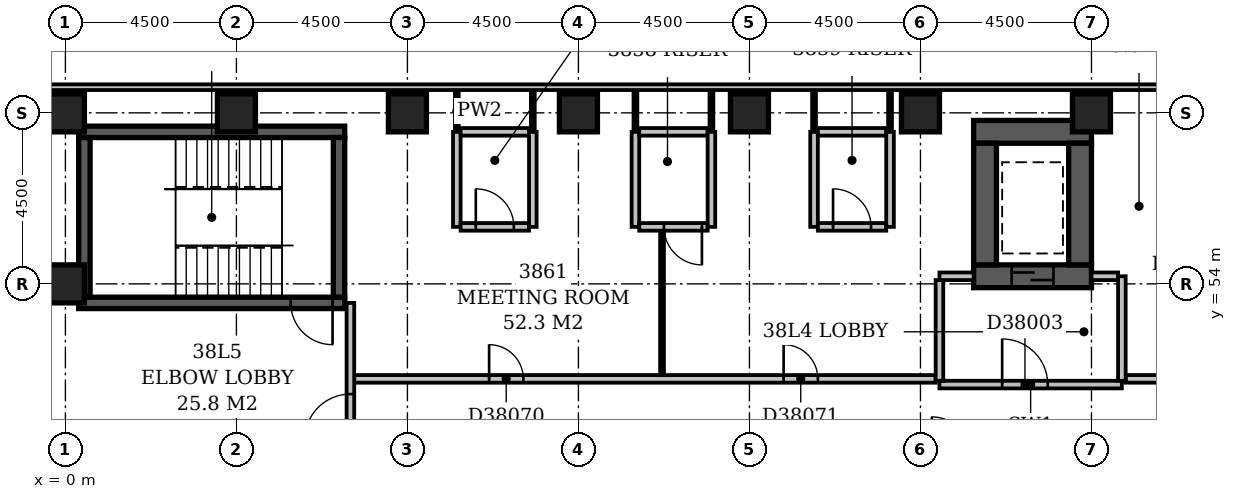
"""IFC4 building model, lengths in metres.
Left out: names, types, materials, properties, quantities, classifications, styles, units other than length and angle.
Written with IfcOpenShell. Run it as: python <this file> out.ifc"""

import sys

from ifc_helpers import new_model, si_unit, direction, frame, frame_2d, origin, origin_2d, place, context, subcontext, project, spatial, rectangle, extrude, element, fill, save


model = new_model("IFC4")
c1 = context("Model", 3, precision=1e-05, world=origin(), true_north=direction((0.0, 1.0)))
c2 = subcontext(c1, "Body", "Model", "MODEL_VIEW")
j1 = project(units=[si_unit("LENGTHUNIT", "METRE"), si_unit("PLANEANGLEUNIT", "RADIAN")], contexts=[c1])
p1 = place(None, origin())
s1 = spatial("IfcSite", under=j1, at=p1, CompositionType="ELEMENT")
p2 = place(p1, origin())
s2 = spatial("IfcBuilding", under=s1, at=p2, CompositionType="ELEMENT")
p3 = place(p2, frame((0.0, 0.0, 152.0)))
s3 = spatial("IfcBuildingStorey", under=s2, at=p3, CompositionType="ELEMENT", Elevation=152.0)
p4 = place(p3, frame((0.35, 53.5, -0.3), z_axis=(0.0, 0.0, 1.0), x_axis=(1.0, 0.0, 0.0)))
e1 = element("IfcWall", 1, at=p4, inside=s3, PredefinedType="SHEAR", context=c2, shape_type="SweptSolid", body=[
    extrude(rectangle(XDim=7.0, YDim=0.3, at=frame_2d((3.5, 0.0))), origin(), (0.0, 0.0, 1.0), 3.6),
])
p5 = place(p4, frame((5.58, 0.0, 0.3)))
e2 = element("IfcOpeningElement", 2, at=p5, cuts=e1, PredefinedType="OPENING", context=c2, shape_type="SweptSolid", body=[
    extrude(rectangle(XDim=1.1, YDim=2.1, at=frame_2d((0.55, 1.05))), frame((0.0, 0.162, 0.0), z_axis=(0.0, -1.0, 0.0), x_axis=(1.0, 0.0, 0.0)), (0.0, 0.0, 1.0), 0.324),
])
p6 = place(p3, frame((0.35, 58.0, -0.3), z_axis=(0.0, 0.0, 1.0), x_axis=(1.0, 0.0, 0.0)))
e3 = element("IfcWall", 3, at=p6, inside=s3, PredefinedType="SHEAR", context=c2, shape_type="SweptSolid", body=[
    extrude(rectangle(XDim=7.0, YDim=0.3, at=frame_2d((3.5, 0.0))), origin(), (0.0, 0.0, 1.0), 3.6),
])
for number, where, z_axis, x_axis in (
    (4, (0.5, 53.65, -0.3), (0.0, 0.0, 1.0), (0.0, 1.0, 0.0)),
    (5, (7.2, 53.65, -0.3), (0.0, 0.0, 1.0), (0.0, 1.0, 0.0)),
):
    element("IfcWall", number, at=place(p3, frame(where, z_axis=z_axis, x_axis=x_axis)), inside=s3, PredefinedType="SHEAR", context=c2, shape_type="SweptSolid", body=[
        extrude(rectangle(XDim=4.2, YDim=0.3, at=frame_2d((2.1, 0.0))), origin(), (0.0, 0.0, 1.0), 3.6),
    ])
p7 = place(p3, frame((23.9, 54.2, -0.3), z_axis=(0.0, 0.0, 1.0), x_axis=(1.0, 0.0, 0.0)))
e6 = element("IfcWall", 6, at=p7, inside=s3, PredefinedType="SHEAR", context=c2, shape_type="SweptSolid", body=[
    extrude(rectangle(XDim=3.1, YDim=0.6, at=frame_2d((1.55, 0.0))), origin(), (0.0, 0.0, 1.0), 3.6),
])
p8 = place(p7, frame((1.0, 0.0, 0.3)))
e7 = element("IfcOpeningElement", 7, at=p8, cuts=e6, PredefinedType="OPENING", context=c2, shape_type="SweptSolid", body=[
    extrude(rectangle(XDim=1.1, YDim=2.1, at=frame_2d((0.55, 1.05))), frame((0.0, 0.312, 0.0), z_axis=(0.0, -1.0, 0.0), x_axis=(1.0, 0.0, 0.0)), (0.0, 0.0, 1.0), 0.624),
])
p9 = place(p3, frame((23.9, 58.0, -0.3), z_axis=(0.0, 0.0, 1.0), x_axis=(1.0, 0.0, 0.0)))
e8 = element("IfcWall", 8, at=p9, inside=s3, PredefinedType="SHEAR", context=c2, shape_type="SweptSolid", body=[
    extrude(rectangle(XDim=3.1, YDim=0.6, at=frame_2d((1.55, 0.0))), origin(), (0.0, 0.0, 1.0), 3.6),
])
for number, where, z_axis, x_axis in (
    (9, (24.2, 54.5, -0.3), (0.0, 0.0, 1.0), (0.0, 1.0, 0.0)),
    (10, (26.7, 54.5, -0.3), (0.0, 0.0, 1.0), (0.0, 1.0, 0.0)),
):
    element("IfcWall", number, at=place(p3, frame(where, z_axis=z_axis, x_axis=x_axis)), inside=s3, PredefinedType="SHEAR", context=c2, shape_type="SweptSolid", body=[
        extrude(rectangle(XDim=3.2, YDim=0.6, at=frame_2d((1.6, 0.0))), origin(), (0.0, 0.0, 1.0), 3.6),
    ])
for number, where, z_axis, x_axis in (
    (11, (0.0, 54.0, -0.3), (0.0, 0.0, 1.0), (1.0, 0.0, 0.0)),
    (12, (0.0, 58.5, -0.3), (0.0, 0.0, 1.0), (1.0, 0.0, 0.0)),
    (13, (4.5, 58.5, -0.3), (0.0, 0.0, 1.0), (1.0, 0.0, 0.0)),
    (14, (9.0, 58.5, -0.3), (0.0, 0.0, 1.0), (1.0, 0.0, 0.0)),
    (15, (13.5, 58.5, -0.3), (0.0, 0.0, 1.0), (1.0, 0.0, 0.0)),
    (16, (18.0, 58.5, -0.3), (0.0, 0.0, 1.0), (1.0, 0.0, 0.0)),
    (17, (22.5, 58.5, -0.3), (0.0, 0.0, 1.0), (1.0, 0.0, 0.0)),
    (18, (27.0, 58.5, -0.3), (0.0, 0.0, 1.0), (1.0, 0.0, 0.0)),
):
    element("IfcColumn", number, at=place(p3, frame(where, z_axis=z_axis, x_axis=x_axis)), inside=s3, PredefinedType="COLUMN", context=c2, shape_type="SweptSolid", body=[
        extrude(rectangle(XDim=1.0, YDim=1.0, at=origin_2d()), origin(), (0.0, 0.0, 1.0), 3.6),
    ])
p10 = place(p3, frame((68.1, 59.175, 0.0), z_axis=(0.0, 0.0, 1.0), x_axis=(-1.0, 0.0, 0.0)))
e19 = element("IfcWall", 19, at=p10, inside=s3, PredefinedType="STANDARD", context=c2, shape_type="SweptSolid", body=[
    extrude(rectangle(XDim=68.85, YDim=0.15, at=frame_2d((34.425, 0.0))), origin(), (0.0, 0.0, 1.0), 2.7),
])
p11 = place(p10, frame((1.65, 0.0, 0.6)))
e20 = element("IfcOpeningElement", 20, at=p11, cuts=e19, PredefinedType="OPENING", context=c2, shape_type="SweptSolid", body=[
    extrude(rectangle(XDim=2.4, YDim=1.8, at=frame_2d((1.2, 0.9))), frame((0.0, 0.087, 0.0), z_axis=(0.0, -1.0, 0.0), x_axis=(1.0, 0.0, 0.0)), (0.0, 0.0, 1.0), 0.174),
])
p12 = place(p10, frame((5.86, 0.0, 0.6)))
e21 = element("IfcOpeningElement", 21, at=p12, cuts=e19, PredefinedType="OPENING", context=c2, shape_type="SweptSolid", body=[
    extrude(rectangle(XDim=1.8, YDim=1.8, at=frame_2d((0.9, 0.9))), frame((0.0, 0.087, 0.0), z_axis=(0.0, -1.0, 0.0), x_axis=(1.0, 0.0, 0.0)), (0.0, 0.0, 1.0), 0.174),
])
p13 = place(p10, frame((15.15, 0.0, 0.6)))
e22 = element("IfcOpeningElement", 22, at=p13, cuts=e19, PredefinedType="OPENING", context=c2, shape_type="SweptSolid", body=[
    extrude(rectangle(XDim=2.4, YDim=1.8, at=frame_2d((1.2, 0.9))), frame((0.0, 0.087, 0.0), z_axis=(0.0, -1.0, 0.0), x_axis=(1.0, 0.0, 0.0)), (0.0, 0.0, 1.0), 0.174),
])
p14 = place(p3, frame((23.0, 51.35, 0.0), z_axis=(0.0, 0.0, 1.0), x_axis=(1.0, 0.0, 0.0)))
e23 = element("IfcWall", 23, at=p14, inside=s3, PredefinedType="PARTITIONING", context=c2, shape_type="SweptSolid", body=[
    extrude(rectangle(XDim=4.8, YDim=0.2, at=frame_2d((2.4, 0.0))), origin(), (0.0, 0.0, 1.0), 3.3),
])
p15 = place(p14, frame((1.65, 0.0, 0.0)))
e24 = element("IfcOpeningElement", 24, at=p15, cuts=e23, PredefinedType="OPENING", context=c2, shape_type="SweptSolid", body=[
    extrude(rectangle(XDim=1.2, YDim=2.1, at=frame_2d((0.6, 1.05))), frame((0.0, 0.112, 0.0), z_axis=(0.0, -1.0, 0.0), x_axis=(1.0, 0.0, 0.0)), (0.0, 0.0, 1.0), 0.224),
])
p16 = place(p3, frame((27.8, 51.45, 0.0), z_axis=(0.0, 0.0, 1.0), x_axis=(0.0, 1.0, 0.0)))
e25 = element("IfcWall", 25, at=p16, inside=s3, PredefinedType="PARTITIONING", context=c2, shape_type="SweptSolid", body=[
    extrude(rectangle(XDim=2.75, YDim=0.2, at=frame_2d((1.375, 0.0))), origin(), (0.0, 0.0, 1.0), 3.3),
])
p17 = place(p3, frame((23.0, 54.2, 0.0), z_axis=(0.0, 0.0, 1.0), x_axis=(1.0, 0.0, 0.0)))
e26 = element("IfcWall", 26, at=p17, inside=s3, PredefinedType="PARTITIONING", context=c2, shape_type="SweptSolid", body=[
    extrude(rectangle(XDim=0.9, YDim=0.2, at=frame_2d((0.45, 0.0))), origin(), (0.0, 0.0, 1.0), 3.3),
])
p18 = place(p3, frame((27.0, 54.2, 0.0), z_axis=(0.0, 0.0, 1.0), x_axis=(1.0, 0.0, 0.0)))
e27 = element("IfcWall", 27, at=p18, inside=s3, PredefinedType="PARTITIONING", context=c2, shape_type="SweptSolid", body=[
    extrude(rectangle(XDim=0.7, YDim=0.2, at=frame_2d((0.35, 0.0))), origin(), (0.0, 0.0, 1.0), 3.3),
])
p19 = place(p3, frame((23.0, 51.45, 0.0), z_axis=(0.0, 0.0, 1.0), x_axis=(0.0, 1.0, 0.0)))
e28 = element("IfcWall", 28, at=p19, inside=s3, PredefinedType="PARTITIONING", context=c2, shape_type="SweptSolid", body=[
    extrude(rectangle(XDim=2.65, YDim=0.2, at=frame_2d((1.325, 0.0))), origin(), (0.0, 0.0, 1.0), 3.3),
])
p20 = place(p3, frame((7.5, 49.6, 0.0), z_axis=(0.0, 0.0, 1.0), x_axis=(0.0, 1.0, 0.0)))
e29 = element("IfcWall", 29, at=p20, inside=s3, PredefinedType="PARTITIONING", context=c2, shape_type="SweptSolid", body=[
    extrude(rectangle(XDim=3.9, YDim=0.2, at=frame_2d((1.95, 0.0))), origin(), (0.0, 0.0, 1.0), 3.3),
])
p21 = place(p20, frame((0.3, 0.0, 0.0)))
e30 = element("IfcOpeningElement", 30, at=p21, cuts=e29, PredefinedType="OPENING", context=c2, shape_type="SweptSolid", body=[
    extrude(rectangle(XDim=1.2, YDim=2.1, at=frame_2d((0.6, 1.05))), frame((0.0, 0.112, 0.0), z_axis=(0.0, -1.0, 0.0), x_axis=(1.0, 0.0, 0.0)), (0.0, 0.0, 1.0), 0.224),
])
p22 = place(p3, frame((7.6, 51.5, 0.0), z_axis=(0.0, 0.0, 1.0), x_axis=(1.0, 0.0, 0.0)))
e31 = element("IfcWall", 31, at=p22, inside=s3, PredefinedType="PARTITIONING", context=c2, shape_type="SweptSolid", body=[
    extrude(rectangle(XDim=15.3, YDim=0.2, at=frame_2d((7.65, 0.0))), origin(), (0.0, 0.0, 1.0), 3.3),
])
p23 = place(p22, frame((3.55, 0.0, 0.0)))
e32 = element("IfcOpeningElement", 32, at=p23, cuts=e31, PredefinedType="OPENING", context=c2, shape_type="SweptSolid", body=[
    extrude(rectangle(XDim=0.9, YDim=2.1, at=frame_2d((0.45, 1.05))), frame((0.0, 0.112, 0.0), z_axis=(0.0, -1.0, 0.0), x_axis=(1.0, 0.0, 0.0)), (0.0, 0.0, 1.0), 0.224),
])
p24 = place(p22, frame((11.3, 0.0, 0.0)))
e33 = element("IfcOpeningElement", 33, at=p24, cuts=e31, PredefinedType="OPENING", context=c2, shape_type="SweptSolid", body=[
    extrude(rectangle(XDim=0.9, YDim=2.1, at=frame_2d((0.45, 1.05))), frame((0.0, 0.112, 0.0), z_axis=(0.0, -1.0, 0.0), x_axis=(1.0, 0.0, 0.0)), (0.0, 0.0, 1.0), 0.224),
])
p25 = place(p3, frame((27.9, 51.5, 0.0), z_axis=(0.0, 0.0, 1.0), x_axis=(1.0, 0.0, 0.0)))
e34 = element("IfcWall", 34, at=p25, inside=s3, PredefinedType="PARTITIONING", context=c2, shape_type="SweptSolid", body=[
    extrude(rectangle(XDim=9.3, YDim=0.2, at=frame_2d((4.65, 0.0))), origin(), (0.0, 0.0, 1.0), 3.3),
])
p26 = place(p25, frame((1.5, 0.0, 0.0)))
e35 = element("IfcOpeningElement", 35, at=p26, cuts=e34, PredefinedType="OPENING", context=c2, shape_type="SweptSolid", body=[
    extrude(rectangle(XDim=1.0, YDim=2.1, at=frame_2d((0.5, 1.05))), frame((0.0, 0.112, 0.0), z_axis=(0.0, -1.0, 0.0), x_axis=(1.0, 0.0, 0.0)), (0.0, 0.0, 1.0), 0.224),
])
p27 = place(p25, frame((6.3, 0.0, 0.0)))
e36 = element("IfcOpeningElement", 36, at=p27, cuts=e34, PredefinedType="OPENING", context=c2, shape_type="SweptSolid", body=[
    extrude(rectangle(XDim=0.9, YDim=2.1, at=frame_2d((0.45, 1.05))), frame((0.0, 0.112, 0.0), z_axis=(0.0, -1.0, 0.0), x_axis=(1.0, 0.0, 0.0)), (0.0, 0.0, 1.0), 0.224),
])
p28 = place(p3, frame((15.7, 51.6, 0.0), z_axis=(0.0, 0.0, 1.0), x_axis=(0.0, 1.0, 0.0)))
e37 = element("IfcWall", 37, at=p28, inside=s3, PredefinedType="PARTITIONING", context=c2, shape_type="SweptSolid", body=[
    extrude(rectangle(XDim=3.8, YDim=0.1, at=frame_2d((1.9, 0.0))), origin(), (0.0, 0.0, 1.0), 3.3),
])
p29 = place(p3, frame((10.3, 55.5, 0.0), z_axis=(0.0, 0.0, 1.0), x_axis=(0.0, 1.0, 0.0)))
e38 = element("IfcWall", 38, at=p29, inside=s3, PredefinedType="PARTITIONING", context=c2, shape_type="SweptSolid", body=[
    extrude(rectangle(XDim=2.5, YDim=0.2, at=frame_2d((1.25, 0.0))), origin(), (0.0, 0.0, 1.0), 3.3),
])
p30 = place(p3, frame((10.4, 55.5, 0.0), z_axis=(0.0, 0.0, 1.0), x_axis=(1.0, 0.0, 0.0)))
e39 = element("IfcWall", 39, at=p30, inside=s3, PredefinedType="PARTITIONING", context=c2, shape_type="SweptSolid", body=[
    extrude(rectangle(XDim=1.8, YDim=0.2, at=frame_2d((0.9, 0.0))), origin(), (0.0, 0.0, 1.0), 3.3),
])
p31 = place(p30, frame((0.4, 0.0, 0.0)))
e40 = element("IfcOpeningElement", 40, at=p31, cuts=e39, PredefinedType="OPENING", context=c2, shape_type="SweptSolid", body=[
    extrude(rectangle(XDim=1.0, YDim=2.1, at=frame_2d((0.5, 1.05))), frame((0.0, 0.112, 0.0), z_axis=(0.0, -1.0, 0.0), x_axis=(1.0, 0.0, 0.0)), (0.0, 0.0, 1.0), 0.224),
])
for number, where, z_axis, x_axis in (
    (41, (12.3, 55.5, 0.0), (0.0, 0.0, 1.0), (0.0, 1.0, 0.0)),
    (42, (15.0, 55.5, 0.0), (0.0, 0.0, 1.0), (0.0, 1.0, 0.0)),
):
    element("IfcWall", number, at=place(p3, frame(where, z_axis=z_axis, x_axis=x_axis)), inside=s3, PredefinedType="PARTITIONING", context=c2, shape_type="SweptSolid", body=[
        extrude(rectangle(XDim=2.5, YDim=0.2, at=frame_2d((1.25, 0.0))), origin(), (0.0, 0.0, 1.0), 3.3),
    ])
p32 = place(p3, frame((15.1, 55.5, 0.0), z_axis=(0.0, 0.0, 1.0), x_axis=(1.0, 0.0, 0.0)))
e43 = element("IfcWall", 43, at=p32, inside=s3, PredefinedType="PARTITIONING", context=c2, shape_type="SweptSolid", body=[
    extrude(rectangle(XDim=1.8, YDim=0.2, at=frame_2d((0.9, 0.0))), origin(), (0.0, 0.0, 1.0), 3.3),
])
p33 = place(p32, frame((0.65, 0.0, 0.0)))
e44 = element("IfcOpeningElement", 44, at=p33, cuts=e43, PredefinedType="OPENING", context=c2, shape_type="SweptSolid", body=[
    extrude(rectangle(XDim=1.0, YDim=2.1, at=frame_2d((0.5, 1.05))), frame((0.0, 0.112, 0.0), z_axis=(0.0, -1.0, 0.0), x_axis=(1.0, 0.0, 0.0)), (0.0, 0.0, 1.0), 0.224),
])
for number, where, z_axis, x_axis in (
    (45, (17.0, 55.5, 0.0), (0.0, 0.0, 1.0), (0.0, 1.0, 0.0)),
    (46, (19.7, 55.5, 0.0), (0.0, 0.0, 1.0), (0.0, 1.0, 0.0)),
):
    element("IfcWall", number, at=place(p3, frame(where, z_axis=z_axis, x_axis=x_axis)), inside=s3, PredefinedType="PARTITIONING", context=c2, shape_type="SweptSolid", body=[
        extrude(rectangle(XDim=2.5, YDim=0.2, at=frame_2d((1.25, 0.0))), origin(), (0.0, 0.0, 1.0), 3.3),
    ])
p34 = place(p3, frame((19.8, 55.5, 0.0), z_axis=(0.0, 0.0, 1.0), x_axis=(1.0, 0.0, 0.0)))
e47 = element("IfcWall", 47, at=p34, inside=s3, PredefinedType="PARTITIONING", context=c2, shape_type="SweptSolid", body=[
    extrude(rectangle(XDim=1.8, YDim=0.2, at=frame_2d((0.9, 0.0))), origin(), (0.0, 0.0, 1.0), 3.3),
])
p35 = place(p34, frame((0.4, 0.0, 0.0)))
e48 = element("IfcOpeningElement", 48, at=p35, cuts=e47, PredefinedType="OPENING", context=c2, shape_type="SweptSolid", body=[
    extrude(rectangle(XDim=1.0, YDim=2.1, at=frame_2d((0.5, 1.05))), frame((0.0, 0.112, 0.0), z_axis=(0.0, -1.0, 0.0), x_axis=(1.0, 0.0, 0.0)), (0.0, 0.0, 1.0), 0.224),
])
p36 = place(p3, frame((21.7, 55.5, 0.0), z_axis=(0.0, 0.0, 1.0), x_axis=(0.0, 1.0, 0.0)))
e49 = element("IfcWall", 49, at=p36, inside=s3, PredefinedType="PARTITIONING", context=c2, shape_type="SweptSolid", body=[
    extrude(rectangle(XDim=2.5, YDim=0.2, at=frame_2d((1.25, 0.0))), origin(), (0.0, 0.0, 1.0), 3.3),
])
p37 = place(p3, frame((10.3, 58.0, 0.0), z_axis=(0.0, 0.0, 1.0), x_axis=(0.0, 1.0, 0.0)))
e50 = element("IfcWall", 50, at=p37, inside=s3, PredefinedType="PARTITIONING", context=c2, shape_type="SweptSolid", body=[
    extrude(rectangle(XDim=1.1, YDim=0.1, at=frame_2d((0.55, 0.0))), origin(), (0.0, 0.0, 1.0), 3.3),
])
p38 = place(p3, frame((10.4, 58.0, 0.0), z_axis=(0.0, 0.0, 1.0), x_axis=(1.0, 0.0, 0.0)))
e51 = element("IfcWall", 51, at=p38, inside=s3, PredefinedType="PARTITIONING", context=c2, shape_type="SweptSolid", body=[
    extrude(rectangle(XDim=1.8, YDim=0.2, at=frame_2d((0.9, 0.0))), origin(), (0.0, 0.0, 1.0), 3.3),
])
for number, where, z_axis, x_axis in (
    (52, (12.3, 58.0, 0.0), (0.0, 0.0, 1.0), (0.0, 1.0, 0.0)),
    (53, (15.0, 58.0, 0.0), (0.0, 0.0, 1.0), (0.0, 1.0, 0.0)),
):
    element("IfcWall", number, at=place(p3, frame(where, z_axis=z_axis, x_axis=x_axis)), inside=s3, PredefinedType="PARTITIONING", context=c2, shape_type="SweptSolid", body=[
        extrude(rectangle(XDim=1.1, YDim=0.1, at=frame_2d((0.55, 0.0))), origin(), (0.0, 0.0, 1.0), 3.3),
    ])
p39 = place(p3, frame((15.1, 58.0, 0.0), z_axis=(0.0, 0.0, 1.0), x_axis=(1.0, 0.0, 0.0)))
e54 = element("IfcWall", 54, at=p39, inside=s3, PredefinedType="PARTITIONING", context=c2, shape_type="SweptSolid", body=[
    extrude(rectangle(XDim=1.8, YDim=0.2, at=frame_2d((0.9, 0.0))), origin(), (0.0, 0.0, 1.0), 3.3),
])
for number, where, z_axis, x_axis in (
    (55, (17.0, 58.0, 0.0), (0.0, 0.0, 1.0), (0.0, 1.0, 0.0)),
    (56, (19.7, 58.0, 0.0), (0.0, 0.0, 1.0), (0.0, 1.0, 0.0)),
):
    element("IfcWall", number, at=place(p3, frame(where, z_axis=z_axis, x_axis=x_axis)), inside=s3, PredefinedType="PARTITIONING", context=c2, shape_type="SweptSolid", body=[
        extrude(rectangle(XDim=1.1, YDim=0.1, at=frame_2d((0.55, 0.0))), origin(), (0.0, 0.0, 1.0), 3.3),
    ])
p40 = place(p3, frame((19.8, 58.0, 0.0), z_axis=(0.0, 0.0, 1.0), x_axis=(1.0, 0.0, 0.0)))
e57 = element("IfcWall", 57, at=p40, inside=s3, PredefinedType="PARTITIONING", context=c2, shape_type="SweptSolid", body=[
    extrude(rectangle(XDim=1.8, YDim=0.2, at=frame_2d((0.9, 0.0))), origin(), (0.0, 0.0, 1.0), 3.3),
])
p41 = place(p3, frame((21.7, 58.0, 0.0), z_axis=(0.0, 0.0, 1.0), x_axis=(0.0, 1.0, 0.0)))
e58 = element("IfcWall", 58, at=p41, inside=s3, PredefinedType="PARTITIONING", context=c2, shape_type="SweptSolid", body=[
    extrude(rectangle(XDim=1.1, YDim=0.1, at=frame_2d((0.55, 0.0))), origin(), (0.0, 0.0, 1.0), 3.3),
])
p42 = place(p21, origin())
e59 = element("IfcDoor", 59, at=p42, inside=s3, OperationType="SINGLE_SWING_LEFT", PredefinedType="DOOR", context=c2, shape_type="SweptSolid", body=[
    extrude(rectangle(XDim=1.2, YDim=2.1, at=frame_2d((0.6, 1.05))), frame((0.0, 0.025, 0.0), z_axis=(0.0, -1.0, 0.0), x_axis=(1.0, 0.0, 0.0)), (0.0, 0.0, 1.0), 0.05),
])
fill(e30, e59)
p43 = place(p15, origin())
e60 = element("IfcDoor", 60, at=p43, inside=s3, OperationType="SINGLE_SWING_LEFT", PredefinedType="DOOR", context=c2, shape_type="SweptSolid", body=[
    extrude(rectangle(XDim=1.2, YDim=2.1, at=frame_2d((0.6, 1.05))), frame((0.0, 0.025, 0.0), z_axis=(0.0, -1.0, 0.0), x_axis=(1.0, 0.0, 0.0)), (0.0, 0.0, 1.0), 0.05),
])
fill(e24, e60)
p44 = place(p8, origin())
e61 = element("IfcDoor", 61, at=p44, inside=s3, OperationType="SLIDING_TO_LEFT", PredefinedType="DOOR", context=c2, shape_type="SweptSolid", body=[
    extrude(rectangle(XDim=1.1, YDim=2.1, at=frame_2d((0.55, 1.05))), frame((0.0, 0.025, 0.0), z_axis=(0.0, -1.0, 0.0), x_axis=(1.0, 0.0, 0.0)), (0.0, 0.0, 1.0), 0.05),
])
fill(e7, e61)
p45 = place(p5, origin())
e62 = element("IfcDoor", 62, at=p45, inside=s3, OperationType="SINGLE_SWING_RIGHT", PredefinedType="DOOR", context=c2, shape_type="SweptSolid", body=[
    extrude(rectangle(XDim=1.1, YDim=2.1, at=frame_2d((0.55, 1.05))), frame((0.0, 0.025, 0.0), z_axis=(0.0, -1.0, 0.0), x_axis=(1.0, 0.0, 0.0)), (0.0, 0.0, 1.0), 0.05),
])
fill(e2, e62)
p46 = place(p23, origin())
e63 = element("IfcDoor", 63, at=p46, inside=s3, OperationType="SINGLE_SWING_LEFT", PredefinedType="DOOR", context=c2, shape_type="SweptSolid", body=[
    extrude(rectangle(XDim=0.9, YDim=2.1, at=frame_2d((0.45, 1.05))), frame((0.0, 0.025, 0.0), z_axis=(0.0, -1.0, 0.0), x_axis=(1.0, 0.0, 0.0)), (0.0, 0.0, 1.0), 0.05),
])
fill(e32, e63)
p47 = place(p24, origin())
e64 = element("IfcDoor", 64, at=p47, inside=s3, OperationType="SINGLE_SWING_LEFT", PredefinedType="DOOR", context=c2, shape_type="SweptSolid", body=[
    extrude(rectangle(XDim=0.9, YDim=2.1, at=frame_2d((0.45, 1.05))), frame((0.0, 0.025, 0.0), z_axis=(0.0, -1.0, 0.0), x_axis=(1.0, 0.0, 0.0)), (0.0, 0.0, 1.0), 0.05),
])
fill(e33, e64)
p48 = place(p31, origin())
e65 = element("IfcDoor", 65, at=p48, inside=s3, OperationType="SINGLE_SWING_LEFT", PredefinedType="DOOR", context=c2, shape_type="SweptSolid", body=[
    extrude(rectangle(XDim=1.0, YDim=2.1, at=frame_2d((0.5, 1.05))), frame((0.0, 0.025, 0.0), z_axis=(0.0, -1.0, 0.0), x_axis=(1.0, 0.0, 0.0)), (0.0, 0.0, 1.0), 0.05),
])
fill(e40, e65)
p49 = place(p33, origin())
e66 = element("IfcDoor", 66, at=p49, inside=s3, OperationType="SINGLE_SWING_RIGHT", PredefinedType="DOOR", context=c2, shape_type="SweptSolid", body=[
    extrude(rectangle(XDim=1.0, YDim=2.1, at=frame_2d((0.5, 1.05))), frame((0.0, 0.025, 0.0), z_axis=(0.0, -1.0, 0.0), x_axis=(1.0, 0.0, 0.0)), (0.0, 0.0, 1.0), 0.05),
])
fill(e44, e66)
p50 = place(p35, origin())
e67 = element("IfcDoor", 67, at=p50, inside=s3, OperationType="SINGLE_SWING_LEFT", PredefinedType="DOOR", context=c2, shape_type="SweptSolid", body=[
    extrude(rectangle(XDim=1.0, YDim=2.1, at=frame_2d((0.5, 1.05))), frame((0.0, 0.025, 0.0), z_axis=(0.0, -1.0, 0.0), x_axis=(1.0, 0.0, 0.0)), (0.0, 0.0, 1.0), 0.05),
])
fill(e48, e67)
save(model, sys.argv[1])
